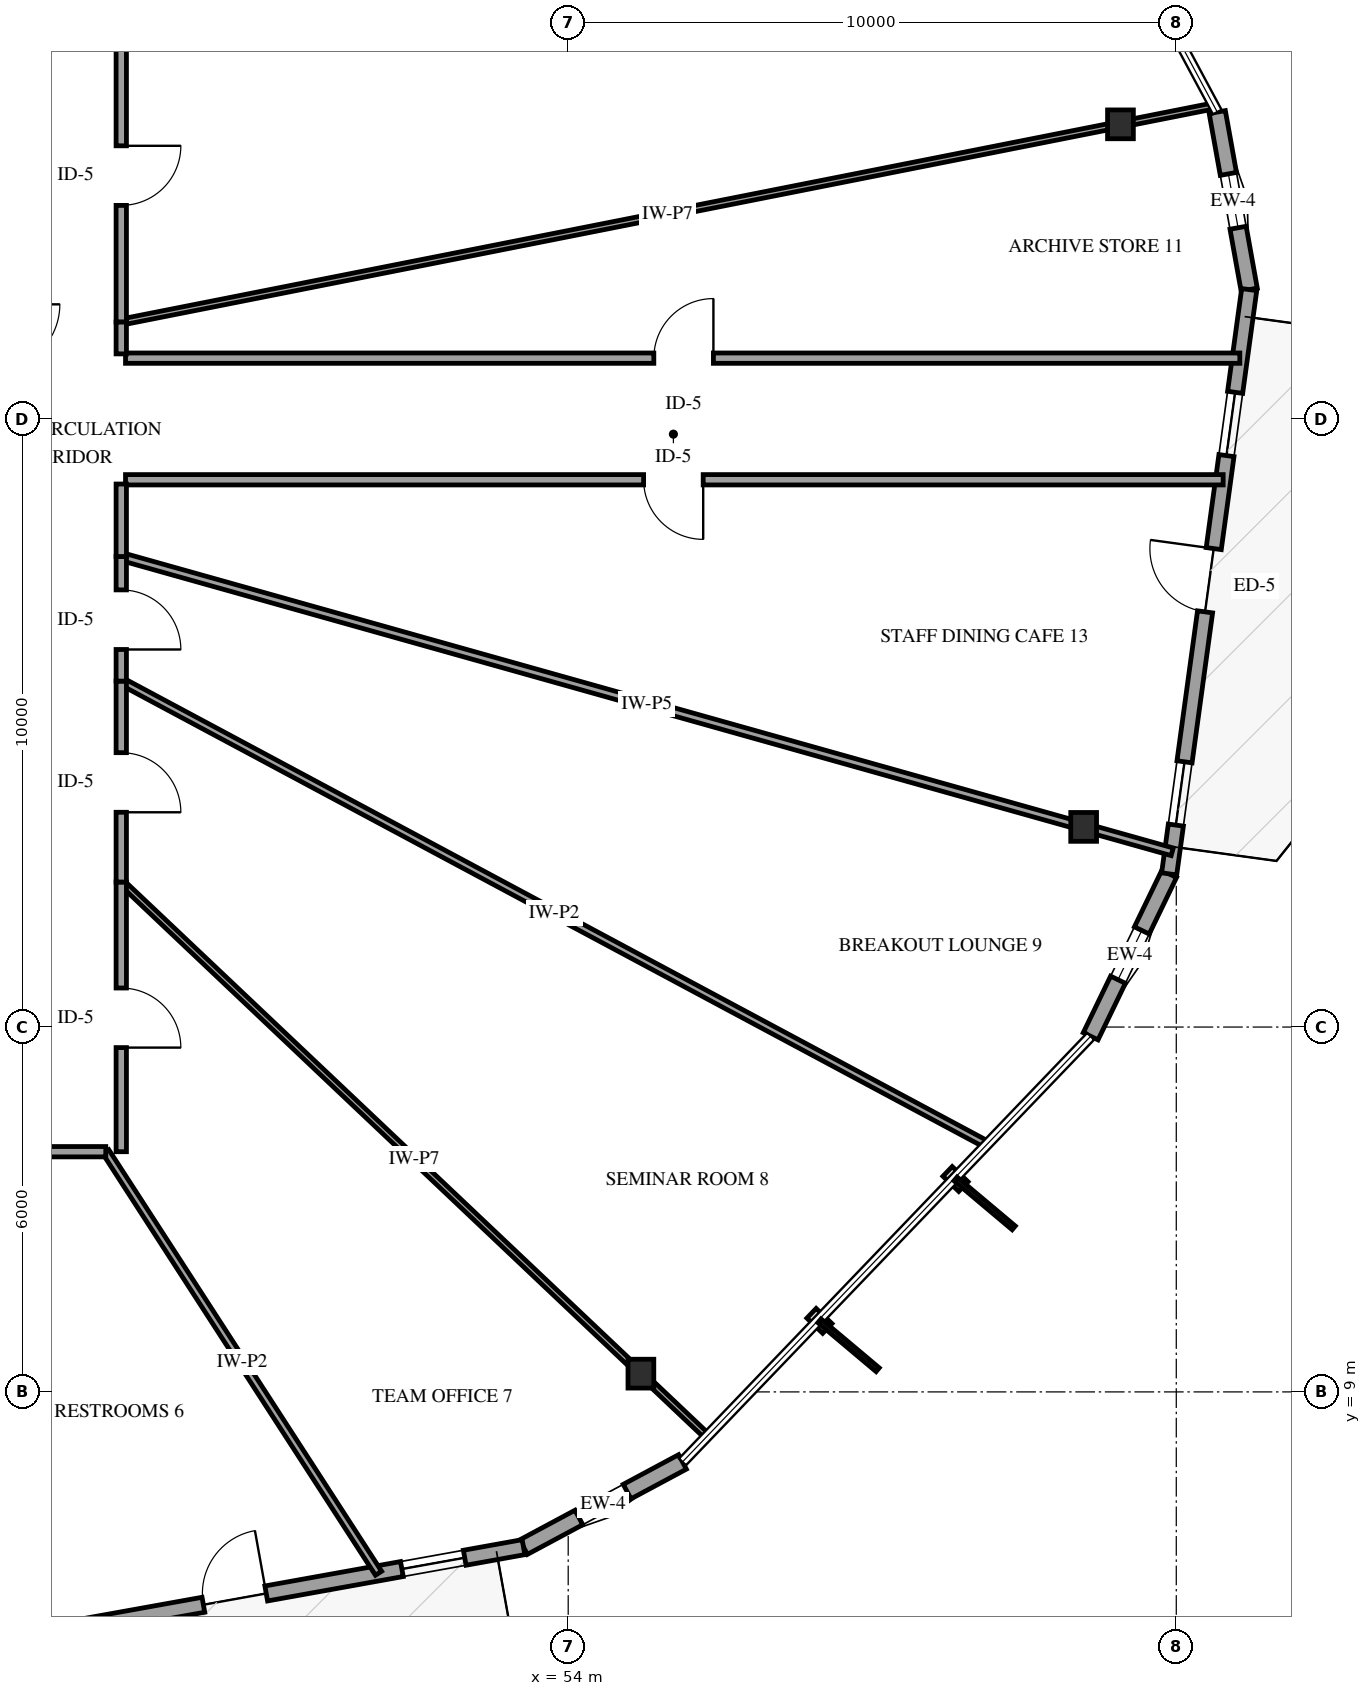
"""IFC4 building model, lengths in metres.
Left out: names, types, materials, properties, quantities, classifications, styles, units other than length and angle.
Written with IfcOpenShell. Run it as: python <this file> out.ifc"""

import sys

from ifc_helpers import new_model, si_unit, direction, frame, frame_2d, origin, origin_2d, place, context, subcontext, project, spatial, rectangle, i_section, extrude, element, fill, save


model = new_model("IFC4")
c1 = context("Model", 3, precision=1e-05, world=origin(), true_north=direction((0.0, 1.0)))
c2 = subcontext(c1, "Body", "Model", "MODEL_VIEW")
j1 = project(units=[si_unit("LENGTHUNIT", "METRE"), si_unit("PLANEANGLEUNIT", "RADIAN")], contexts=[c1])
p1 = place(None, origin())
s1 = spatial("IfcSite", under=j1, at=p1, CompositionType="ELEMENT")
p2 = place(p1, origin())
s2 = spatial("IfcBuilding", under=s1, at=p2, CompositionType="ELEMENT")
p3 = place(p2, frame((0.0, 0.0, 66.6)))
s3 = spatial("IfcBuildingStorey", under=s2, at=p3, CompositionType="ELEMENT", Elevation=66.6)
for number, where, z_axis, x_axis in (
    (1, (63.082, 29.845, 0.0), (0.0, 0.0, 1.0), (1.0, 0.0, 0.0)),
    (2, (55.196, 9.3, 0.0), (0.0, 0.0, 1.0), (1.0, 0.0, 0.0)),
    (3, (62.477, 18.292, 0.0), (0.0, 0.0, 1.0), (1.0, 0.0, 0.0)),
):
    element("IfcColumn", number, at=place(p3, frame(where, z_axis=z_axis, x_axis=x_axis)), inside=s3, PredefinedType="COLUMN", context=c2, shape_type="SweptSolid", body=[
        extrude(i_section(OverallWidth=0.424, OverallDepth=0.474, WebThickness=0.048, FlangeThickness=0.077, FilletRadius=0.038, at=origin_2d()), origin(), (0.0, 0.0, 1.0), 4.0),
    ])
p4 = place(p3, frame((53.265, 6.447, 0.0), z_axis=(0.0, 0.0, 1.0), x_axis=(0.881307407795, 0.47254338739, 0.0)))
e4 = element("IfcWall", 4, at=p4, inside=s3, PredefinedType="SOLIDWALL", context=c2, shape_type="SweptSolid", body=[
    extrude(rectangle(XDim=2.967, YDim=0.27, at=frame_2d((1.483, 0.0))), origin(), (0.0, 0.0, 1.0), 3.079),
])
p5 = place(p4, frame((1.033, 0.0, 0.75)))
e5 = element("IfcOpeningElement", 5, at=p5, cuts=e4, PredefinedType="OPENING", context=c2, shape_type="SweptSolid", body=[
    extrude(rectangle(XDim=0.9, YDim=1.5, at=frame_2d((0.45, 0.75))), frame((0.0, 0.145, 0.0), z_axis=(0.0, -1.0, 0.0), x_axis=(1.0, 0.0, 0.0)), (0.0, 0.0, 1.0), 0.29),
])
p6 = place(p3, frame((43.72, 4.729, 0.0), z_axis=(0.0, 0.0, 1.0), x_axis=(0.984196927588, 0.177077406028, 0.0)))
e6 = element("IfcWall", 6, at=p6, inside=s3, PredefinedType="SOLIDWALL", context=c2, shape_type="SweptSolid", body=[
    extrude(rectangle(XDim=9.698, YDim=0.25, at=frame_2d((4.849, 0.0))), origin(), (0.0, 0.0, 1.0), 3.079),
])
p7 = place(p6, frame((4.349, 0.0, 0.0)))
e7 = element("IfcOpeningElement", 7, at=p7, cuts=e6, PredefinedType="OPENING", context=c2, shape_type="SweptSolid", body=[
    extrude(rectangle(XDim=1.05, YDim=2.15, at=frame_2d((0.525, 1.075))), frame((0.0, 0.135, 0.0), z_axis=(0.0, -1.0, 0.0), x_axis=(1.0, 0.0, 0.0)), (0.0, 0.0, 1.0), 0.27),
])
p8 = place(p6, frame((0.995, 0.0, 0.72)))
e8 = element("IfcOpeningElement", 8, at=p8, cuts=e6, PredefinedType="OPENING", context=c2, shape_type="SweptSolid", body=[
    extrude(rectangle(XDim=1.05, YDim=1.55, at=frame_2d((0.525, 0.775))), frame((0.0, 0.135, 0.0), z_axis=(0.0, -1.0, 0.0), x_axis=(1.0, 0.0, 0.0)), (0.0, 0.0, 1.0), 0.27),
])
p9 = place(p6, frame((7.666, 0.0, 0.72)))
e9 = element("IfcOpeningElement", 9, at=p9, cuts=e6, PredefinedType="OPENING", context=c2, shape_type="SweptSolid", body=[
    extrude(rectangle(XDim=1.05, YDim=1.55, at=frame_2d((0.525, 0.775))), frame((0.0, 0.135, 0.0), z_axis=(0.0, -1.0, 0.0), x_axis=(1.0, 0.0, 0.0)), (0.0, 0.0, 1.0), 0.27),
])
p10 = place(p3, frame((62.592, 14.848, 0.0), z_axis=(0.0, 0.0, 1.0), x_axis=(0.435190898054, 0.900338204371, 0.0)))
e10 = element("IfcWall", 10, at=p10, inside=s3, PredefinedType="SOLIDWALL", context=c2, shape_type="SweptSolid", body=[
    extrude(rectangle(XDim=2.967, YDim=0.27, at=frame_2d((1.483, 0.0))), origin(), (0.0, 0.0, 1.0), 3.079),
])
p11 = place(p10, frame((1.033, 0.0, 0.75)))
e11 = element("IfcOpeningElement", 11, at=p11, cuts=e10, PredefinedType="OPENING", context=c2, shape_type="SweptSolid", body=[
    extrude(rectangle(XDim=0.9, YDim=1.5, at=frame_2d((0.45, 0.75))), frame((0.0, 0.145, 0.0), z_axis=(0.0, -1.0, 0.0), x_axis=(1.0, 0.0, 0.0)), (0.0, 0.0, 1.0), 0.29),
])
p12 = place(p3, frame((65.199, 27.127, 0.0), z_axis=(0.0, 0.0, 1.0), x_axis=(-0.177089231547, 0.984194799859, 0.0)))
e12 = element("IfcWall", 12, at=p12, inside=s3, PredefinedType="SOLIDWALL", context=c2, shape_type="SweptSolid", body=[
    extrude(rectangle(XDim=2.967, YDim=0.27, at=frame_2d((1.483, 0.0))), origin(), (0.0, 0.0, 1.0), 3.079),
])
p13 = place(p12, frame((1.033, 0.0, 0.75)))
e13 = element("IfcOpeningElement", 13, at=p13, cuts=e12, PredefinedType="OPENING", context=c2, shape_type="SweptSolid", body=[
    extrude(rectangle(XDim=0.9, YDim=1.5, at=frame_2d((0.45, 0.75))), frame((0.0, 0.145, 0.0), z_axis=(0.0, -1.0, 0.0), x_axis=(1.0, 0.0, 0.0)), (0.0, 0.0, 1.0), 0.29),
])
p14 = place(p3, frame((63.883, 17.519, 0.0), z_axis=(0.0, 0.0, 1.0), x_axis=(0.13571645175, 0.99074772002, 0.0)))
e14 = element("IfcWall", 14, at=p14, inside=s3, PredefinedType="SOLIDWALL", context=c2, shape_type="SweptSolid", body=[
    extrude(rectangle(XDim=9.698, YDim=0.25, at=frame_2d((4.849, 0.0))), origin(), (0.0, 0.0, 1.0), 3.079),
])
p15 = place(p14, frame((4.349, 0.0, 0.0)))
e15 = element("IfcOpeningElement", 15, at=p15, cuts=e14, PredefinedType="OPENING", context=c2, shape_type="SweptSolid", body=[
    extrude(rectangle(XDim=1.05, YDim=2.15, at=frame_2d((0.525, 1.075))), frame((0.0, 0.135, 0.0), z_axis=(0.0, -1.0, 0.0), x_axis=(1.0, 0.0, 0.0)), (0.0, 0.0, 1.0), 0.27),
])
p16 = place(p14, frame((0.81, 0.0, 0.72)))
e16 = element("IfcOpeningElement", 16, at=p16, cuts=e14, PredefinedType="OPENING", context=c2, shape_type="SweptSolid", body=[
    extrude(rectangle(XDim=1.05, YDim=1.55, at=frame_2d((0.525, 0.775))), frame((0.0, 0.135, 0.0), z_axis=(0.0, -1.0, 0.0), x_axis=(1.0, 0.0, 0.0)), (0.0, 0.0, 1.0), 0.27),
])
p17 = place(p14, frame((6.943, 0.0, 0.72)))
e17 = element("IfcOpeningElement", 17, at=p17, cuts=e14, PredefinedType="OPENING", context=c2, shape_type="SweptSolid", body=[
    extrude(rectangle(XDim=1.05, YDim=1.55, at=frame_2d((0.525, 0.775))), frame((0.0, 0.135, 0.0), z_axis=(0.0, -1.0, 0.0), x_axis=(1.0, 0.0, 0.0)), (0.0, 0.0, 1.0), 0.27),
])
p18 = place(p3, frame((46.72, 26.0, 0.0), z_axis=(0.0, 0.0, 1.0), x_axis=(1.0, 0.0, 0.0)))
e18 = element("IfcWall", 18, at=p18, inside=s3, PredefinedType="PARTITIONING", context=c2, shape_type="SweptSolid", body=[
    extrude(rectangle(XDim=18.325, YDim=0.17, at=frame_2d((9.163, 0.0))), origin(), (0.0, 0.0, 1.0), 3.7),
])
p19 = place(p18, frame((8.688, 0.0, 0.0)))
e19 = element("IfcOpeningElement", 19, at=p19, cuts=e18, PredefinedType="OPENING", context=c2, shape_type="SweptSolid", body=[
    extrude(rectangle(XDim=0.98, YDim=2.15, at=frame_2d((0.49, 1.075))), frame((0.0, 0.095, 0.0), z_axis=(0.0, -1.0, 0.0), x_axis=(1.0, 0.0, 0.0)), (0.0, 0.0, 1.0), 0.19),
])
p20 = place(p3, frame((46.65, 26.593, 0.0), z_axis=(0.0, 0.0, 1.0), x_axis=(0.980976457062, 0.194126738728, 0.0)))
e20 = element("IfcWall", 20, at=p20, inside=s3, PredefinedType="PARTITIONING", context=c2, shape_type="SweptSolid", body=[
    extrude(rectangle(XDim=18.317, YDim=0.1, at=frame_2d((9.159, 0.0))), origin(), (0.0, 0.0, 1.0), 2.995),
])
p21 = place(p3, frame((64.771, 24.0, 0.0), z_axis=(0.0, 0.0, 1.0), x_axis=(-1.0, 0.0, 0.0)))
e21 = element("IfcWall", 21, at=p21, inside=s3, PredefinedType="PARTITIONING", context=c2, shape_type="SweptSolid", body=[
    extrude(rectangle(XDim=18.051, YDim=0.17, at=frame_2d((9.025, 0.0))), origin(), (0.0, 0.0, 1.0), 3.7),
])
p22 = place(p21, frame((8.551, 0.0, 0.0)))
e22 = element("IfcOpeningElement", 22, at=p22, cuts=e21, PredefinedType="OPENING", context=c2, shape_type="SweptSolid", body=[
    extrude(rectangle(XDim=0.98, YDim=2.15, at=frame_2d((0.49, 1.075))), frame((0.0, 0.095, 0.0), z_axis=(0.0, -1.0, 0.0), x_axis=(1.0, 0.0, 0.0)), (0.0, 0.0, 1.0), 0.19),
])
p23 = place(p3, frame((46.65, 22.738, 0.0), z_axis=(0.0, 0.0, 1.0), x_axis=(0.962722681171, -0.270490367958, 0.0)))
e23 = element("IfcWall", 23, at=p23, inside=s3, PredefinedType="PARTITIONING", context=c2, shape_type="SweptSolid", body=[
    extrude(rectangle(XDim=17.952, YDim=0.13, at=frame_2d((8.976, 0.0))), origin(), (0.0, 0.0, 1.0), 2.995),
])
p24 = place(p3, frame((46.65, 20.689, 0.0), z_axis=(0.0, 0.0, 1.0), x_axis=(0.881611431833, -0.471975935045, 0.0)))
e24 = element("IfcWall", 24, at=p24, inside=s3, PredefinedType="PARTITIONING", context=c2, shape_type="SweptSolid", body=[
    extrude(rectangle(XDim=16.147, YDim=0.12, at=frame_2d((8.073, 0.0))), origin(), (0.0, 0.0, 1.0), 3.7),
])
p25 = place(p3, frame((46.65, 17.385, 0.0), z_axis=(0.0, 0.0, 1.0), x_axis=(0.726403836212, -0.687268118522, 0.0)))
e25 = element("IfcWall", 25, at=p25, inside=s3, PredefinedType="PARTITIONING", context=c2, shape_type="SweptSolid", body=[
    extrude(rectangle(XDim=13.263, YDim=0.1, at=frame_2d((6.631, 0.0))), origin(), (0.0, 0.0, 1.0), 2.995),
])
p26 = place(p3, frame((46.395, 12.95, 0.0), z_axis=(0.0, 0.0, 1.0), x_axis=(0.543315028439, -0.839528903536, 0.0)))
e26 = element("IfcWall", 26, at=p26, inside=s3, PredefinedType="PARTITIONING", context=c2, shape_type="SweptSolid", body=[
    extrude(rectangle(XDim=8.257, YDim=0.12, at=frame_2d((4.128, 0.0))), origin(), (0.0, 0.0, 1.0), 3.7),
])
p27 = place(p3, frame((46.65, 31.442, 0.0), z_axis=(0.0, 0.0, 1.0), x_axis=(0.0, -1.0, 0.0)))
e27 = element("IfcWall", 27, at=p27, inside=s3, PredefinedType="PARTITIONING", context=c2, shape_type="SweptSolid", body=[
    extrude(rectangle(XDim=4.849, YDim=0.17, at=frame_2d((2.424, 0.0))), origin(), (0.0, 0.0, 1.0), 3.7),
])
p28 = place(p27, frame((1.95, 0.0, 0.0)))
e28 = element("IfcOpeningElement", 28, at=p28, cuts=e27, PredefinedType="OPENING", context=c2, shape_type="SweptSolid", body=[
    extrude(rectangle(XDim=0.98, YDim=2.15, at=frame_2d((0.49, 1.075))), frame((0.0, 0.095, 0.0), z_axis=(0.0, -1.0, 0.0), x_axis=(1.0, 0.0, 0.0)), (0.0, 0.0, 1.0), 0.19),
])
p29 = place(p3, frame((46.65, 17.385, 0.0), z_axis=(0.0, 0.0, 1.0), x_axis=(0.0, -1.0, 0.0)))
e29 = element("IfcWall", 29, at=p29, inside=s3, PredefinedType="PARTITIONING", context=c2, shape_type="SweptSolid", body=[
    extrude(rectangle(XDim=4.435, YDim=0.17, at=frame_2d((2.218, 0.0))), origin(), (0.0, 0.0, 1.0), 3.7),
])
p30 = place(p29, frame((1.743, 0.0, 0.0)))
e30 = element("IfcOpeningElement", 30, at=p30, cuts=e29, PredefinedType="OPENING", context=c2, shape_type="SweptSolid", body=[
    extrude(rectangle(XDim=0.98, YDim=2.15, at=frame_2d((0.49, 1.075))), frame((0.0, 0.095, 0.0), z_axis=(0.0, -1.0, 0.0), x_axis=(1.0, 0.0, 0.0)), (0.0, 0.0, 1.0), 0.19),
])
p31 = place(p3, frame((46.395, 12.95, 0.0), z_axis=(0.0, 0.0, 1.0), x_axis=(-1.0, 0.0, 0.0)))
e31 = element("IfcWall", 31, at=p31, inside=s3, PredefinedType="PARTITIONING", context=c2, shape_type="SweptSolid", body=[
    extrude(rectangle(XDim=4.301, YDim=0.17, at=frame_2d((2.15, 0.0))), origin(), (0.0, 0.0, 1.0), 3.7),
])
p32 = place(p31, frame((1.676, 0.0, 0.0)))
e32 = element("IfcOpeningElement", 32, at=p32, cuts=e31, PredefinedType="OPENING", context=c2, shape_type="SweptSolid", body=[
    extrude(rectangle(XDim=0.98, YDim=2.15, at=frame_2d((0.49, 1.075))), frame((0.0, 0.095, 0.0), z_axis=(0.0, -1.0, 0.0), x_axis=(1.0, 0.0, 0.0)), (0.0, 0.0, 1.0), 0.19),
])
p33 = place(p3, frame((46.65, 20.689, 0.0), z_axis=(0.0, 0.0, 1.0), x_axis=(0.0, -1.0, 0.0)))
e33 = element("IfcWall", 33, at=p33, inside=s3, PredefinedType="PARTITIONING", context=c2, shape_type="SweptSolid", body=[
    extrude(rectangle(XDim=3.304, YDim=0.17, at=frame_2d((1.652, 0.0))), origin(), (0.0, 0.0, 1.0), 3.7),
])
p34 = place(p33, frame((1.177, 0.0, 0.0)))
e34 = element("IfcOpeningElement", 34, at=p34, cuts=e33, PredefinedType="OPENING", context=c2, shape_type="SweptSolid", body=[
    extrude(rectangle(XDim=0.98, YDim=2.15, at=frame_2d((0.49, 1.075))), frame((0.0, 0.095, 0.0), z_axis=(0.0, -1.0, 0.0), x_axis=(1.0, 0.0, 0.0)), (0.0, 0.0, 1.0), 0.19),
])
p35 = place(p3, frame((46.65, 22.738, 0.0), z_axis=(0.0, 0.0, 1.0), x_axis=(0.0, -1.0, 0.0)))
e35 = element("IfcWall", 35, at=p35, inside=s3, PredefinedType="PARTITIONING", context=c2, shape_type="SweptSolid", body=[
    extrude(rectangle(XDim=2.049, YDim=0.17, at=frame_2d((1.024, 0.0))), origin(), (0.0, 0.0, 1.0), 3.7),
])
p36 = place(p35, frame((0.549, 0.0, 0.0)))
e36 = element("IfcOpeningElement", 36, at=p36, cuts=e35, PredefinedType="OPENING", context=c2, shape_type="SweptSolid", body=[
    extrude(rectangle(XDim=0.98, YDim=2.15, at=frame_2d((0.49, 1.075))), frame((0.0, 0.095, 0.0), z_axis=(0.0, -1.0, 0.0), x_axis=(1.0, 0.0, 0.0)), (0.0, 0.0, 1.0), 0.19),
])
p37 = place(p3, frame((46.65, 23.93, 0.0), z_axis=(0.0, 0.0, 1.0), x_axis=(0.0, -1.0, 0.0)))
e37 = element("IfcWall", 37, at=p37, inside=s3, PredefinedType="PARTITIONING", context=c2, shape_type="SweptSolid", body=[
    extrude(rectangle(XDim=1.192, YDim=0.17, at=frame_2d((0.596, 0.0))), origin(), (0.0, 0.0, 1.0), 3.7),
])
p38 = place(p3, frame((46.65, 26.593, 0.0), z_axis=(0.0, 0.0, 1.0), x_axis=(0.0, -1.0, 0.0)))
e38 = element("IfcWall", 38, at=p38, inside=s3, PredefinedType="PARTITIONING", context=c2, shape_type="SweptSolid", body=[
    extrude(rectangle(XDim=0.523, YDim=0.17, at=frame_2d((0.261, 0.0))), origin(), (0.0, 0.0, 1.0), 3.7),
])
p39 = place(p5, origin())
e39 = element("IfcWindow", 39, at=p39, inside=s3, PartitioningType="SINGLE_PANEL", PredefinedType="WINDOW", context=c2, shape_type="SweptSolid", body=[
    extrude(rectangle(XDim=0.9, YDim=1.5, at=frame_2d((0.45, 0.75))), frame((0.0, 0.03, 0.0), z_axis=(0.0, -1.0, 0.0), x_axis=(1.0, 0.0, 0.0)), (0.0, 0.0, 1.0), 0.06),
])
fill(e5, e39)
p40 = place(p7, origin())
e40 = element("IfcDoor", 40, at=p40, inside=s3, OperationType="SINGLE_SWING_RIGHT", PredefinedType="DOOR", context=c2, shape_type="SweptSolid", body=[
    extrude(rectangle(XDim=1.05, YDim=2.15, at=frame_2d((0.525, 1.075))), frame((0.0, 0.025, 0.0), z_axis=(0.0, -1.0, 0.0), x_axis=(1.0, 0.0, 0.0)), (0.0, 0.0, 1.0), 0.05),
])
fill(e7, e40)
p41 = place(p9, origin())
e41 = element("IfcWindow", 41, at=p41, inside=s3, PartitioningType="SINGLE_PANEL", PredefinedType="WINDOW", context=c2, shape_type="SweptSolid", body=[
    extrude(rectangle(XDim=1.05, YDim=1.55, at=frame_2d((0.525, 0.775))), frame((0.0, 0.03, 0.0), z_axis=(0.0, -1.0, 0.0), x_axis=(1.0, 0.0, 0.0)), (0.0, 0.0, 1.0), 0.06),
])
fill(e9, e41)
p42 = place(p11, origin())
e42 = element("IfcWindow", 42, at=p42, inside=s3, PartitioningType="SINGLE_PANEL", PredefinedType="WINDOW", context=c2, shape_type="SweptSolid", body=[
    extrude(rectangle(XDim=0.9, YDim=1.5, at=frame_2d((0.45, 0.75))), frame((0.0, 0.03, 0.0), z_axis=(0.0, -1.0, 0.0), x_axis=(1.0, 0.0, 0.0)), (0.0, 0.0, 1.0), 0.06),
])
fill(e11, e42)
p43 = place(p13, origin())
e43 = element("IfcWindow", 43, at=p43, inside=s3, PartitioningType="SINGLE_PANEL", PredefinedType="WINDOW", context=c2, shape_type="SweptSolid", body=[
    extrude(rectangle(XDim=0.9, YDim=1.5, at=frame_2d((0.45, 0.75))), frame((0.0, 0.03, 0.0), z_axis=(0.0, -1.0, 0.0), x_axis=(1.0, 0.0, 0.0)), (0.0, 0.0, 1.0), 0.06),
])
fill(e13, e43)
p44 = place(p15, origin())
e44 = element("IfcDoor", 44, at=p44, inside=s3, OperationType="SINGLE_SWING_RIGHT", PredefinedType="DOOR", context=c2, shape_type="SweptSolid", body=[
    extrude(rectangle(XDim=1.05, YDim=2.15, at=frame_2d((0.525, 1.075))), frame((0.0, 0.025, 0.0), z_axis=(0.0, -1.0, 0.0), x_axis=(1.0, 0.0, 0.0)), (0.0, 0.0, 1.0), 0.05),
])
fill(e15, e44)
p45 = place(p16, origin())
e45 = element("IfcWindow", 45, at=p45, inside=s3, PartitioningType="SINGLE_PANEL", PredefinedType="WINDOW", context=c2, shape_type="SweptSolid", body=[
    extrude(rectangle(XDim=1.05, YDim=1.55, at=frame_2d((0.525, 0.775))), frame((0.0, 0.03, 0.0), z_axis=(0.0, -1.0, 0.0), x_axis=(1.0, 0.0, 0.0)), (0.0, 0.0, 1.0), 0.06),
])
fill(e16, e45)
p46 = place(p17, origin())
e46 = element("IfcWindow", 46, at=p46, inside=s3, PartitioningType="SINGLE_PANEL", PredefinedType="WINDOW", context=c2, shape_type="SweptSolid", body=[
    extrude(rectangle(XDim=1.05, YDim=1.55, at=frame_2d((0.525, 0.775))), frame((0.0, 0.03, 0.0), z_axis=(0.0, -1.0, 0.0), x_axis=(1.0, 0.0, 0.0)), (0.0, 0.0, 1.0), 0.06),
])
fill(e17, e46)
p47 = place(p19, origin())
e47 = element("IfcDoor", 47, at=p47, inside=s3, OperationType="SINGLE_SWING_RIGHT", PredefinedType="DOOR", context=c2, shape_type="SweptSolid", body=[
    extrude(rectangle(XDim=0.98, YDim=2.15, at=frame_2d((0.49, 1.075))), frame((0.0, 0.025, 0.0), z_axis=(0.0, -1.0, 0.0), x_axis=(1.0, 0.0, 0.0)), (0.0, 0.0, 1.0), 0.05),
])
fill(e19, e47)
p48 = place(p22, origin())
e48 = element("IfcDoor", 48, at=p48, inside=s3, OperationType="SINGLE_SWING_LEFT", PredefinedType="DOOR", context=c2, shape_type="SweptSolid", body=[
    extrude(rectangle(XDim=0.98, YDim=2.15, at=frame_2d((0.49, 1.075))), frame((0.0, 0.025, 0.0), z_axis=(0.0, -1.0, 0.0), x_axis=(1.0, 0.0, 0.0)), (0.0, 0.0, 1.0), 0.05),
])
fill(e22, e48)
p49 = place(p28, origin())
e49 = element("IfcDoor", 49, at=p49, inside=s3, OperationType="SINGLE_SWING_LEFT", PredefinedType="DOOR", context=c2, shape_type="SweptSolid", body=[
    extrude(rectangle(XDim=0.98, YDim=2.15, at=frame_2d((0.49, 1.075))), frame((0.0, 0.025, 0.0), z_axis=(0.0, -1.0, 0.0), x_axis=(1.0, 0.0, 0.0)), (0.0, 0.0, 1.0), 0.05),
])
fill(e28, e49)
p50 = place(p30, origin())
e50 = element("IfcDoor", 50, at=p50, inside=s3, OperationType="SINGLE_SWING_RIGHT", PredefinedType="DOOR", context=c2, shape_type="SweptSolid", body=[
    extrude(rectangle(XDim=0.98, YDim=2.15, at=frame_2d((0.49, 1.075))), frame((0.0, 0.025, 0.0), z_axis=(0.0, -1.0, 0.0), x_axis=(1.0, 0.0, 0.0)), (0.0, 0.0, 1.0), 0.05),
])
fill(e30, e50)
p51 = place(p34, origin())
e51 = element("IfcDoor", 51, at=p51, inside=s3, OperationType="SINGLE_SWING_RIGHT", PredefinedType="DOOR", context=c2, shape_type="SweptSolid", body=[
    extrude(rectangle(XDim=0.98, YDim=2.15, at=frame_2d((0.49, 1.075))), frame((0.0, 0.025, 0.0), z_axis=(0.0, -1.0, 0.0), x_axis=(1.0, 0.0, 0.0)), (0.0, 0.0, 1.0), 0.05),
])
fill(e34, e51)
p52 = place(p36, origin())
e52 = element("IfcDoor", 52, at=p52, inside=s3, OperationType="SINGLE_SWING_RIGHT", PredefinedType="DOOR", context=c2, shape_type="SweptSolid", body=[
    extrude(rectangle(XDim=0.98, YDim=2.15, at=frame_2d((0.49, 1.075))), frame((0.0, 0.025, 0.0), z_axis=(0.0, -1.0, 0.0), x_axis=(1.0, 0.0, 0.0)), (0.0, 0.0, 1.0), 0.05),
])
fill(e36, e52)
save(model, sys.argv[1])
